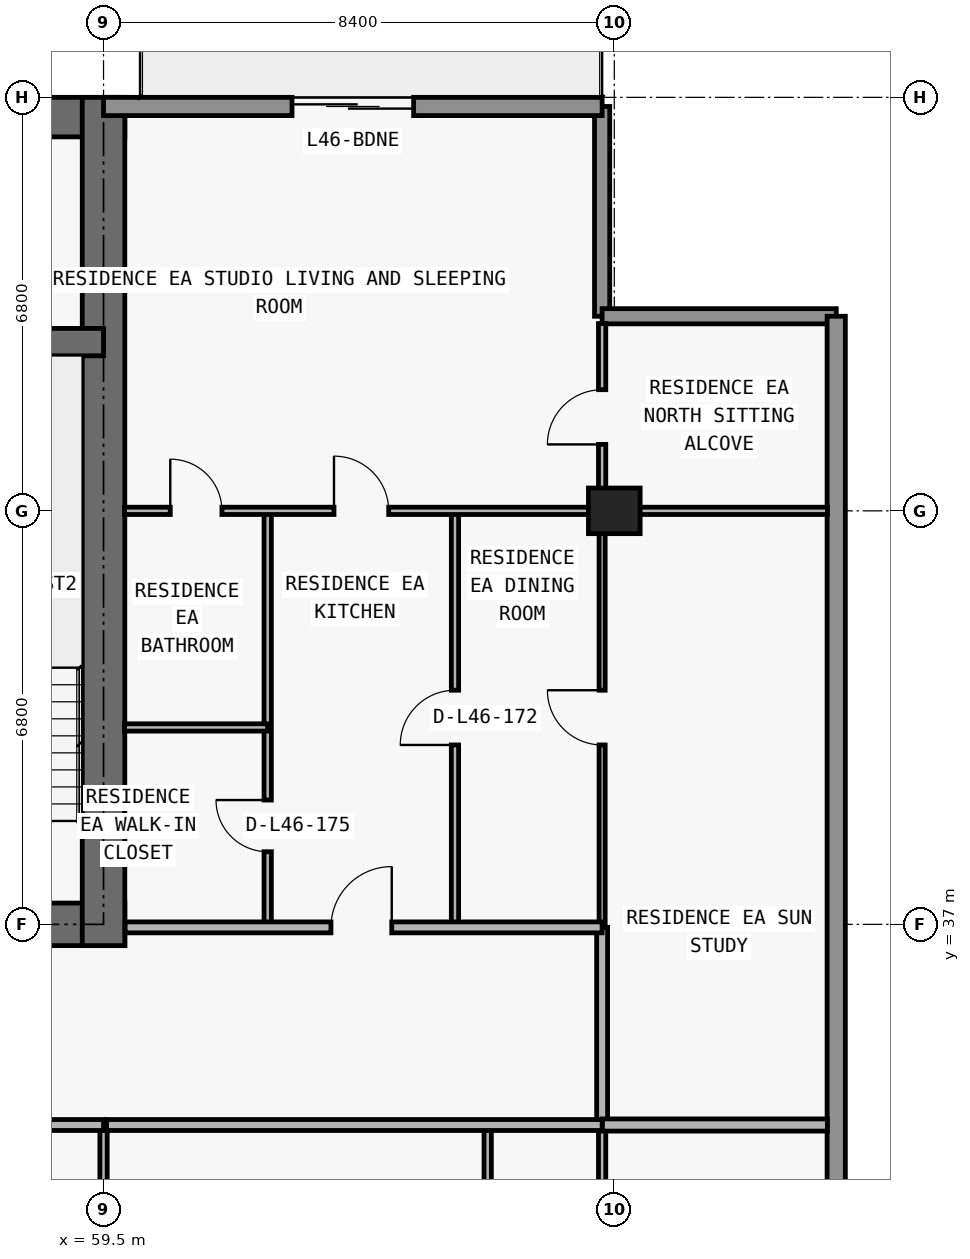
"""IFC4 building model, lengths in metres.
Left out: names, types, materials, properties, quantities, classifications, styles, units other than length and angle.
Written with IfcOpenShell. Run it as: python <this file> out.ifc"""

import sys

from ifc_helpers import new_model, si_unit, direction, frame, frame_2d, origin, origin_2d, place, context, subcontext, project, spatial, rectangle, extrude, element, fill, save


model = new_model("IFC4")
c1 = context("Model", 3, precision=1e-05, world=origin(), true_north=direction((0.0, 1.0)))
c2 = subcontext(c1, "Body", "Model", "MODEL_VIEW")
j1 = project(units=[si_unit("LENGTHUNIT", "METRE"), si_unit("PLANEANGLEUNIT", "RADIAN")], contexts=[c1])
p1 = place(None, origin())
s1 = spatial("IfcSite", under=j1, at=p1, CompositionType="ELEMENT")
p2 = place(p1, origin())
s2 = spatial("IfcBuilding", under=s1, at=p2, CompositionType="ELEMENT")
p3 = place(p2, frame((0.0, 0.0, 167.1)))
s3 = spatial("IfcBuildingStorey", under=s2, at=p3, CompositionType="ELEMENT", Elevation=167.1)
p4 = place(p3, frame((67.9, 43.8, 0.0), z_axis=(0.0, 0.0, 1.0), x_axis=(1.0, 0.0, 0.0)))
e1 = element("IfcColumn", 1, at=p4, inside=s3, PredefinedType="COLUMN", context=c2, shape_type="SweptSolid", body=[
    extrude(rectangle(XDim=0.85, YDim=0.75, at=origin_2d()), origin(), (0.0, 0.0, 1.0), 3.05),
])
p5 = place(p3, frame((17.95, 37.0, 0.0), z_axis=(0.0, 0.0, 1.0), x_axis=(1.0, 0.0, 0.0)))
e2 = element("IfcWall", 2, at=p5, inside=s3, PredefinedType="SHEAR", context=c2, shape_type="SweptSolid", body=[
    extrude(rectangle(XDim=41.9, YDim=0.7, at=frame_2d((20.95, 0.0))), origin(), (0.0, 0.0, 1.0), 3.05),
])
p6 = place(p5, frame((14.35, 0.0, 0.0)))
e3 = element("IfcOpeningElement", 3, at=p6, cuts=e2, PredefinedType="OPENING", context=c2, shape_type="SweptSolid", body=[
    extrude(rectangle(XDim=1.1, YDim=2.15, at=frame_2d((0.55, 1.075))), frame((0.0, 0.36, 0.0), z_axis=(0.0, -1.0, 0.0), x_axis=(1.0, 0.0, 0.0)), (0.0, 0.0, 1.0), 0.72),
])
p7 = place(p5, frame((6.2, 0.0, 0.0)))
e4 = element("IfcOpeningElement", 4, at=p7, cuts=e2, PredefinedType="OPENING", context=c2, shape_type="SweptSolid", body=[
    extrude(rectangle(XDim=1.05, YDim=2.15, at=frame_2d((0.525, 1.075))), frame((0.0, 0.36, 0.0), z_axis=(0.0, -1.0, 0.0), x_axis=(1.0, 0.0, 0.0)), (0.0, 0.0, 1.0), 0.72),
])
p8 = place(p5, frame((34.7, 0.0, 0.0)))
e5 = element("IfcOpeningElement", 5, at=p8, cuts=e2, PredefinedType="OPENING", context=c2, shape_type="SweptSolid", body=[
    extrude(rectangle(XDim=1.05, YDim=2.15, at=frame_2d((0.525, 1.075))), frame((0.0, 0.36, 0.0), z_axis=(0.0, -1.0, 0.0), x_axis=(1.0, 0.0, 0.0)), (0.0, 0.0, 1.0), 0.72),
])
p9 = place(p5, frame((10.812, 0.0, 0.0)))
e6 = element("IfcOpeningElement", 6, at=p9, cuts=e2, PredefinedType="OPENING", context=c2, shape_type="SweptSolid", body=[
    extrude(rectangle(XDim=1.05, YDim=2.15, at=frame_2d((0.525, 1.075))), frame((0.0, 0.36, 0.0), z_axis=(0.0, -1.0, 0.0), x_axis=(1.0, 0.0, 0.0)), (0.0, 0.0, 1.0), 0.72),
])
p10 = place(p5, frame((24.05, 0.0, 0.0)))
e7 = element("IfcOpeningElement", 7, at=p10, cuts=e2, PredefinedType="OPENING", context=c2, shape_type="SweptSolid", body=[
    extrude(rectangle(XDim=1.05, YDim=2.15, at=frame_2d((0.525, 1.075))), frame((0.0, 0.36, 0.0), z_axis=(0.0, -1.0, 0.0), x_axis=(1.0, 0.0, 0.0)), (0.0, 0.0, 1.0), 0.72),
])
p11 = place(p3, frame((17.95, 50.275, 0.0), z_axis=(0.0, 0.0, 1.0), x_axis=(1.0, 0.0, 0.0)))
e8 = element("IfcWall", 8, at=p11, inside=s3, PredefinedType="SHEAR", context=c2, shape_type="SweptSolid", body=[
    extrude(rectangle(XDim=41.9, YDim=0.65, at=frame_2d((20.95, 0.0))), origin(), (0.0, 0.0, 1.0), 3.05),
])
p12 = place(p3, frame((59.5, 36.65, 0.0), z_axis=(0.0, 0.0, 1.0), x_axis=(0.0, 1.0, 0.0)))
e9 = element("IfcWall", 9, at=p12, inside=s3, PredefinedType="SHEAR", context=c2, shape_type="SweptSolid", body=[
    extrude(rectangle(XDim=13.95, YDim=0.7, at=frame_2d((6.975, 0.0))), origin(), (0.0, 0.0, 1.0), 3.05),
])
p13 = place(p3, frame((18.3, 46.575, 0.0), z_axis=(0.0, 0.0, 1.0), x_axis=(1.0, 0.0, 0.0)))
e10 = element("IfcWall", 10, at=p13, inside=s3, PredefinedType="SHEAR", context=c2, shape_type="SweptSolid", body=[
    extrude(rectangle(XDim=41.2, YDim=0.45, at=frame_2d((20.6, 0.0))), origin(), (0.0, 0.0, 1.0), 3.05),
])
p14 = place(p13, frame((7.575, 0.0, 0.0)))
e11 = element("IfcOpeningElement", 11, at=p14, cuts=e10, PredefinedType="OPENING", context=c2, shape_type="SweptSolid", body=[
    extrude(rectangle(XDim=1.05, YDim=2.15, at=frame_2d((0.525, 1.075))), frame((0.0, 0.235, 0.0), z_axis=(0.0, -1.0, 0.0), x_axis=(1.0, 0.0, 0.0)), (0.0, 0.0, 1.0), 0.47),
])
p15 = place(p13, frame((32.625, 0.0, 0.0)))
e12 = element("IfcOpeningElement", 12, at=p15, cuts=e10, PredefinedType="OPENING", context=c2, shape_type="SweptSolid", body=[
    extrude(rectangle(XDim=1.05, YDim=2.15, at=frame_2d((0.525, 1.075))), frame((0.0, 0.235, 0.0), z_axis=(0.0, -1.0, 0.0), x_axis=(1.0, 0.0, 0.0)), (0.0, 0.0, 1.0), 0.47),
])
p16 = place(p3, frame((67.7, 50.45, 0.0), z_axis=(0.0, 0.0, 1.0), x_axis=(0.0, -1.0, 0.0)))
e13 = element("IfcWall", 13, at=p16, inside=s3, PredefinedType="ELEMENTEDWALL", context=c2, shape_type="SweptSolid", body=[
    extrude(rectangle(XDim=3.45, YDim=0.25, at=frame_2d((1.725, 0.0))), origin(), (0.0, 0.0, 1.0), 3.05),
])
p17 = place(p3, frame((67.7, 47.0, 0.0), z_axis=(0.0, 0.0, 1.0), x_axis=(1.0, 0.0, 0.0)))
e14 = element("IfcWall", 14, at=p17, inside=s3, PredefinedType="ELEMENTEDWALL", context=c2, shape_type="SweptSolid", body=[
    extrude(rectangle(XDim=3.85, YDim=0.25, at=frame_2d((1.925, 0.0))), origin(), (0.0, 0.0, 1.0), 3.05),
])
p18 = place(p3, frame((71.55, 47.0, 0.0), z_axis=(0.0, 0.0, 1.0), x_axis=(0.0, -1.0, 0.0)))
e15 = element("IfcWall", 15, at=p18, inside=s3, PredefinedType="STANDARD", context=c2, shape_type="SweptSolid", body=[
    extrude(rectangle(XDim=17.9, YDim=0.3, at=frame_2d((8.95, 0.0))), origin(), (0.0, 0.0, 1.0), 3.05),
])
p19 = place(p3, frame((59.5, 50.45, 0.0), z_axis=(0.0, 0.0, 1.0), x_axis=(1.0, 0.0, 0.0)))
e16 = element("IfcWall", 16, at=p19, inside=s3, PredefinedType="STANDARD", context=c2, shape_type="SweptSolid", body=[
    extrude(rectangle(XDim=8.2, YDim=0.3, at=frame_2d((4.1, 0.0))), origin(), (0.0, 0.0, 1.0), 3.05),
])
p20 = place(p19, frame((3.1, 0.0, 0.0)))
e17 = element("IfcOpeningElement", 17, at=p20, cuts=e16, PredefinedType="OPENING", context=c2, shape_type="SweptSolid", body=[
    extrude(rectangle(XDim=2.0, YDim=2.3, at=frame_2d((1.0, 1.15))), frame((0.0, 0.16, 0.0), z_axis=(0.0, -1.0, 0.0), x_axis=(1.0, 0.0, 0.0)), (0.0, 0.0, 1.0), 0.32),
])
p21 = place(p3, frame((59.5, 29.44, 0.0), z_axis=(0.0, 0.0, 1.0), x_axis=(0.0, 1.0, 0.0)))
e18 = element("IfcWall", 18, at=p21, inside=s3, PredefinedType="PARTITIONING", context=c2, shape_type="SweptSolid", body=[
    extrude(rectangle(XDim=4.26, YDim=0.12, at=frame_2d((2.13, 0.0))), origin(), (0.0, 0.0, 1.0), 2.263),
])
p22 = place(p3, frame((62.2, 37.0, 0.0), z_axis=(0.0, 0.0, 1.0), x_axis=(0.0, 1.0, 0.0)))
e19 = element("IfcWall", 19, at=p22, inside=s3, PredefinedType="PARTITIONING", context=c2, shape_type="SweptSolid", body=[
    extrude(rectangle(XDim=6.8, YDim=0.12, at=frame_2d((3.4, 0.0))), origin(), (0.0, 0.0, 1.0), 3.05),
])
p23 = place(p22, frame((1.194, 0.0, 0.0)))
e20 = element("IfcOpeningElement", 20, at=p23, cuts=e19, PredefinedType="OPENING", context=c2, shape_type="SweptSolid", body=[
    extrude(rectangle(XDim=0.85, YDim=2.1, at=frame_2d((0.425, 1.05))), frame((0.0, 0.07, 0.0), z_axis=(0.0, -1.0, 0.0), x_axis=(1.0, 0.0, 0.0)), (0.0, 0.0, 1.0), 0.14),
])
p24 = place(p3, frame((65.28, 37.0, 0.0), z_axis=(0.0, 0.0, 1.0), x_axis=(0.0, 1.0, 0.0)))
e21 = element("IfcWall", 21, at=p24, inside=s3, PredefinedType="PARTITIONING", context=c2, shape_type="SweptSolid", body=[
    extrude(rectangle(XDim=6.8, YDim=0.12, at=frame_2d((3.4, 0.0))), origin(), (0.0, 0.0, 1.0), 3.05),
])
p25 = place(p24, frame((2.95, 0.0, 0.0)))
e22 = element("IfcOpeningElement", 22, at=p25, cuts=e21, PredefinedType="OPENING", context=c2, shape_type="SweptSolid", body=[
    extrude(rectangle(XDim=0.9, YDim=2.15, at=frame_2d((0.45, 1.075))), frame((0.0, 0.07, 0.0), z_axis=(0.0, -1.0, 0.0), x_axis=(1.0, 0.0, 0.0)), (0.0, 0.0, 1.0), 0.14),
])
p26 = place(p3, frame((65.818, 29.44, 0.0), z_axis=(0.0, 0.0, 1.0), x_axis=(0.0, 1.0, 0.0)))
e23 = element("IfcWall", 23, at=p26, inside=s3, PredefinedType="PARTITIONING", context=c2, shape_type="SweptSolid", body=[
    extrude(rectangle(XDim=4.26, YDim=0.12, at=frame_2d((2.13, 0.0))), origin(), (0.0, 0.0, 1.0), 3.05),
])
p27 = place(p26, frame((1.705, 0.0, 0.0)))
e24 = element("IfcOpeningElement", 24, at=p27, cuts=e23, PredefinedType="OPENING", context=c2, shape_type="SweptSolid", body=[
    extrude(rectangle(XDim=0.85, YDim=2.1, at=frame_2d((0.425, 1.05))), frame((0.0, 0.07, 0.0), z_axis=(0.0, -1.0, 0.0), x_axis=(1.0, 0.0, 0.0)), (0.0, 0.0, 1.0), 0.14),
])
p28 = place(p3, frame((67.7, 29.44, 0.0), z_axis=(0.0, 0.0, 1.0), x_axis=(0.0, 1.0, 0.0)))
e25 = element("IfcWall", 25, at=p28, inside=s3, PredefinedType="PARTITIONING", context=c2, shape_type="SweptSolid", body=[
    extrude(rectangle(XDim=4.26, YDim=0.12, at=frame_2d((2.13, 0.0))), origin(), (0.0, 0.0, 1.0), 2.263),
])
p29 = place(p3, frame((67.7, 33.705, 0.0), z_axis=(0.0, 0.0, 1.0), x_axis=(0.0, 1.0, 0.0)))
e26 = element("IfcWall", 26, at=p29, inside=s3, PredefinedType="PARTITIONING", context=c2, shape_type="SweptSolid", body=[
    extrude(rectangle(XDim=3.245, YDim=0.18, at=frame_2d((1.623, 0.0))), origin(), (0.0, 0.0, 1.0), 2.263),
])
p30 = place(p3, frame((67.7, 37.0, 0.0), z_axis=(0.0, 0.0, 1.0), x_axis=(0.0, 1.0, 0.0)))
e27 = element("IfcWall", 27, at=p30, inside=s3, PredefinedType="MOVABLE", context=c2, shape_type="SweptSolid", body=[
    extrude(rectangle(XDim=6.8, YDim=0.1, at=frame_2d((3.4, 0.0))), origin(), (0.0, 0.0, 1.0), 2.263),
])
p31 = place(p30, frame((2.95, 0.0, 0.0)))
e28 = element("IfcOpeningElement", 28, at=p31, cuts=e27, PredefinedType="OPENING", context=c2, shape_type="SweptSolid", body=[
    extrude(rectangle(XDim=0.9, YDim=2.15, at=frame_2d((0.45, 1.075))), frame((0.0, 0.06, 0.0), z_axis=(0.0, -1.0, 0.0), x_axis=(1.0, 0.0, 0.0)), (0.0, 0.0, 1.0), 0.12),
])
p32 = place(p3, frame((67.7, 43.805, 0.0), z_axis=(0.0, 0.0, 1.0), x_axis=(0.0, 1.0, 0.0)))
e29 = element("IfcWall", 29, at=p32, inside=s3, PredefinedType="PARTITIONING", context=c2, shape_type="SweptSolid", body=[
    extrude(rectangle(XDim=3.075, YDim=0.12, at=frame_2d((1.538, 0.0))), origin(), (0.0, 0.0, 1.0), 3.05),
])
p33 = place(p32, frame((1.087, 0.0, 0.0)))
e30 = element("IfcOpeningElement", 30, at=p33, cuts=e29, PredefinedType="OPENING", context=c2, shape_type="SweptSolid", body=[
    extrude(rectangle(XDim=0.9, YDim=2.15, at=frame_2d((0.45, 1.075))), frame((0.0, 0.07, 0.0), z_axis=(0.0, -1.0, 0.0), x_axis=(1.0, 0.0, 0.0)), (0.0, 0.0, 1.0), 0.14),
])
p34 = place(p3, frame((31.4, 33.7, 0.0), z_axis=(0.0, 0.0, 1.0), x_axis=(1.0, 0.0, 0.0)))
e31 = element("IfcWall", 31, at=p34, inside=s3, PredefinedType="PARTITIONING", context=c2, shape_type="SweptSolid", body=[
    extrude(rectangle(XDim=28.1, YDim=0.18, at=frame_2d((14.05, 0.0))), origin(), (0.0, 0.0, 1.0), 3.05),
])
p35 = place(p34, frame((5.97, 0.0, 0.0)))
e32 = element("IfcOpeningElement", 32, at=p35, cuts=e31, PredefinedType="OPENING", context=c2, shape_type="SweptSolid", body=[
    extrude(rectangle(XDim=1.0, YDim=2.2, at=frame_2d((0.5, 1.1))), frame((0.0, 0.1, 0.0), z_axis=(0.0, -1.0, 0.0), x_axis=(1.0, 0.0, 0.0)), (0.0, 0.0, 1.0), 0.2),
])
p36 = place(p34, frame((13.824, 0.0, 0.0)))
e33 = element("IfcOpeningElement", 33, at=p36, cuts=e31, PredefinedType="OPENING", context=c2, shape_type="SweptSolid", body=[
    extrude(rectangle(XDim=1.0, YDim=2.2, at=frame_2d((0.5, 1.1))), frame((0.0, 0.1, 0.0), z_axis=(0.0, -1.0, 0.0), x_axis=(1.0, 0.0, 0.0)), (0.0, 0.0, 1.0), 0.2),
])
p37 = place(p34, frame((22.349, 0.0, 0.0)))
e34 = element("IfcOpeningElement", 34, at=p37, cuts=e31, PredefinedType="OPENING", context=c2, shape_type="SweptSolid", body=[
    extrude(rectangle(XDim=1.0, YDim=2.2, at=frame_2d((0.5, 1.1))), frame((0.0, 0.1, 0.0), z_axis=(0.0, -1.0, 0.0), x_axis=(1.0, 0.0, 0.0)), (0.0, 0.0, 1.0), 0.2),
])
p38 = place(p3, frame((59.55, 33.7, 0.0), z_axis=(0.0, 0.0, 1.0), x_axis=(1.0, 0.0, 0.0)))
e35 = element("IfcWall", 35, at=p38, inside=s3, PredefinedType="PARTITIONING", context=c2, shape_type="SweptSolid", body=[
    extrude(rectangle(XDim=8.15, YDim=0.18, at=frame_2d((4.075, 0.0))), origin(), (0.0, 0.0, 1.0), 3.05),
])
p39 = place(p3, frame((67.705, 33.7, 0.0), z_axis=(0.0, 0.0, 1.0), x_axis=(1.0, 0.0, 0.0)))
e36 = element("IfcWall", 36, at=p39, inside=s3, PredefinedType="PARTITIONING", context=c2, shape_type="SweptSolid", body=[
    extrude(rectangle(XDim=3.7, YDim=0.2, at=frame_2d((1.85, 0.0))), origin(), (0.0, 0.0, 1.0), 3.05),
])
p40 = place(p3, frame((59.855, 36.95, 0.0), z_axis=(0.0, 0.0, 1.0), x_axis=(1.0, 0.0, 0.0)))
e37 = element("IfcWall", 37, at=p40, inside=s3, PredefinedType="PARTITIONING", context=c2, shape_type="SweptSolid", body=[
    extrude(rectangle(XDim=7.845, YDim=0.18, at=frame_2d((3.922, 0.0))), origin(), (0.0, 0.0, 1.0), 3.05),
])
p41 = place(p40, frame((3.385, 0.0, 0.0)))
e38 = element("IfcOpeningElement", 38, at=p41, cuts=e37, PredefinedType="OPENING", context=c2, shape_type="SweptSolid", body=[
    extrude(rectangle(XDim=1.0, YDim=2.2, at=frame_2d((0.5, 1.1))), frame((0.0, 0.1, 0.0), z_axis=(0.0, -1.0, 0.0), x_axis=(1.0, 0.0, 0.0)), (0.0, 0.0, 1.0), 0.2),
])
p42 = place(p3, frame((59.845, 40.238, 0.0), z_axis=(0.0, 0.0, 1.0), x_axis=(1.0, 0.0, 0.0)))
e39 = element("IfcWall", 39, at=p42, inside=s3, PredefinedType="PARTITIONING", context=c2, shape_type="SweptSolid", body=[
    extrude(rectangle(XDim=2.355, YDim=0.12, at=frame_2d((1.177, 0.0))), origin(), (0.0, 0.0, 1.0), 3.05),
])
p43 = place(p3, frame((59.845, 43.8, 0.0), z_axis=(0.0, 0.0, 1.0), x_axis=(1.0, 0.0, 0.0)))
e40 = element("IfcWall", 40, at=p43, inside=s3, PredefinedType="PARTITIONING", context=c2, shape_type="SweptSolid", body=[
    extrude(rectangle(XDim=11.56, YDim=0.12, at=frame_2d((5.78, 0.0))), origin(), (0.0, 0.0, 1.0), 2.418),
])
p44 = place(p43, frame((3.445, 0.0, 0.0)))
e41 = element("IfcOpeningElement", 41, at=p44, cuts=e40, PredefinedType="OPENING", context=c2, shape_type="SweptSolid", body=[
    extrude(rectangle(XDim=0.9, YDim=2.15, at=frame_2d((0.45, 1.075))), frame((0.0, 0.07, 0.0), z_axis=(0.0, -1.0, 0.0), x_axis=(1.0, 0.0, 0.0)), (0.0, 0.0, 1.0), 0.14),
])
p45 = place(p43, frame((0.752, 0.0, 0.0)))
e42 = element("IfcOpeningElement", 42, at=p45, cuts=e40, PredefinedType="OPENING", context=c2, shape_type="SweptSolid", body=[
    extrude(rectangle(XDim=0.85, YDim=2.1, at=frame_2d((0.425, 1.05))), frame((0.0, 0.07, 0.0), z_axis=(0.0, -1.0, 0.0), x_axis=(1.0, 0.0, 0.0)), (0.0, 0.0, 1.0), 0.14),
])
p46 = place(p20, origin())
e43 = element("IfcDoor", 43, at=p46, inside=s3, OperationType="DOUBLE_DOOR_SLIDING", PredefinedType="DOOR", context=c2, shape_type="SweptSolid", body=[
    extrude(rectangle(XDim=2.0, YDim=2.3, at=frame_2d((1.0, 1.15))), frame((0.0, 0.025, 0.0), z_axis=(0.0, -1.0, 0.0), x_axis=(1.0, 0.0, 0.0)), (0.0, 0.0, 1.0), 0.05),
])
fill(e17, e43)
p47 = place(p25, origin())
e44 = element("IfcDoor", 44, at=p47, inside=s3, OperationType="SINGLE_SWING_LEFT", PredefinedType="DOOR", context=c2, shape_type="SweptSolid", body=[
    extrude(rectangle(XDim=0.9, YDim=2.15, at=frame_2d((0.45, 1.075))), frame((0.0, 0.025, 0.0), z_axis=(0.0, -1.0, 0.0), x_axis=(1.0, 0.0, 0.0)), (0.0, 0.0, 1.0), 0.05),
])
fill(e22, e44)
p48 = place(p41, origin())
e45 = element("IfcDoor", 45, at=p48, inside=s3, OperationType="SINGLE_SWING_RIGHT", PredefinedType="DOOR", context=c2, shape_type="SweptSolid", body=[
    extrude(rectangle(XDim=1.0, YDim=2.2, at=frame_2d((0.5, 1.1))), frame((0.0, 0.025, 0.0), z_axis=(0.0, -1.0, 0.0), x_axis=(1.0, 0.0, 0.0)), (0.0, 0.0, 1.0), 0.05),
])
fill(e38, e45)
p49 = place(p44, origin())
e46 = element("IfcDoor", 46, at=p49, inside=s3, OperationType="SINGLE_SWING_LEFT", PredefinedType="DOOR", context=c2, shape_type="SweptSolid", body=[
    extrude(rectangle(XDim=0.9, YDim=2.15, at=frame_2d((0.45, 1.075))), frame((0.0, 0.025, 0.0), z_axis=(0.0, -1.0, 0.0), x_axis=(1.0, 0.0, 0.0)), (0.0, 0.0, 1.0), 0.05),
])
fill(e41, e46)
p50 = place(p23, origin())
e47 = element("IfcDoor", 47, at=p50, inside=s3, OperationType="SINGLE_SWING_RIGHT", PredefinedType="DOOR", context=c2, shape_type="SweptSolid", body=[
    extrude(rectangle(XDim=0.85, YDim=2.1, at=frame_2d((0.425, 1.05))), frame((0.0, 0.025, 0.0), z_axis=(0.0, -1.0, 0.0), x_axis=(1.0, 0.0, 0.0)), (0.0, 0.0, 1.0), 0.05),
])
fill(e20, e47)
p51 = place(p45, origin())
e48 = element("IfcDoor", 48, at=p51, inside=s3, OperationType="SINGLE_SWING_LEFT", PredefinedType="DOOR", context=c2, shape_type="SweptSolid", body=[
    extrude(rectangle(XDim=0.85, YDim=2.1, at=frame_2d((0.425, 1.05))), frame((0.0, 0.025, 0.0), z_axis=(0.0, -1.0, 0.0), x_axis=(1.0, 0.0, 0.0)), (0.0, 0.0, 1.0), 0.05),
])
fill(e42, e48)
p52 = place(p31, origin())
e49 = element("IfcDoor", 49, at=p52, inside=s3, OperationType="SINGLE_SWING_RIGHT", PredefinedType="DOOR", context=c2, shape_type="SweptSolid", body=[
    extrude(rectangle(XDim=0.9, YDim=2.15, at=frame_2d((0.45, 1.075))), frame((0.0, 0.025, 0.0), z_axis=(0.0, -1.0, 0.0), x_axis=(1.0, 0.0, 0.0)), (0.0, 0.0, 1.0), 0.05),
])
fill(e28, e49)
p53 = place(p33, origin())
e50 = element("IfcDoor", 50, at=p53, inside=s3, OperationType="SINGLE_SWING_LEFT", PredefinedType="DOOR", context=c2, shape_type="SweptSolid", body=[
    extrude(rectangle(XDim=0.9, YDim=2.15, at=frame_2d((0.45, 1.075))), frame((0.0, 0.025, 0.0), z_axis=(0.0, -1.0, 0.0), x_axis=(1.0, 0.0, 0.0)), (0.0, 0.0, 1.0), 0.05),
])
fill(e30, e50)
save(model, sys.argv[1])
